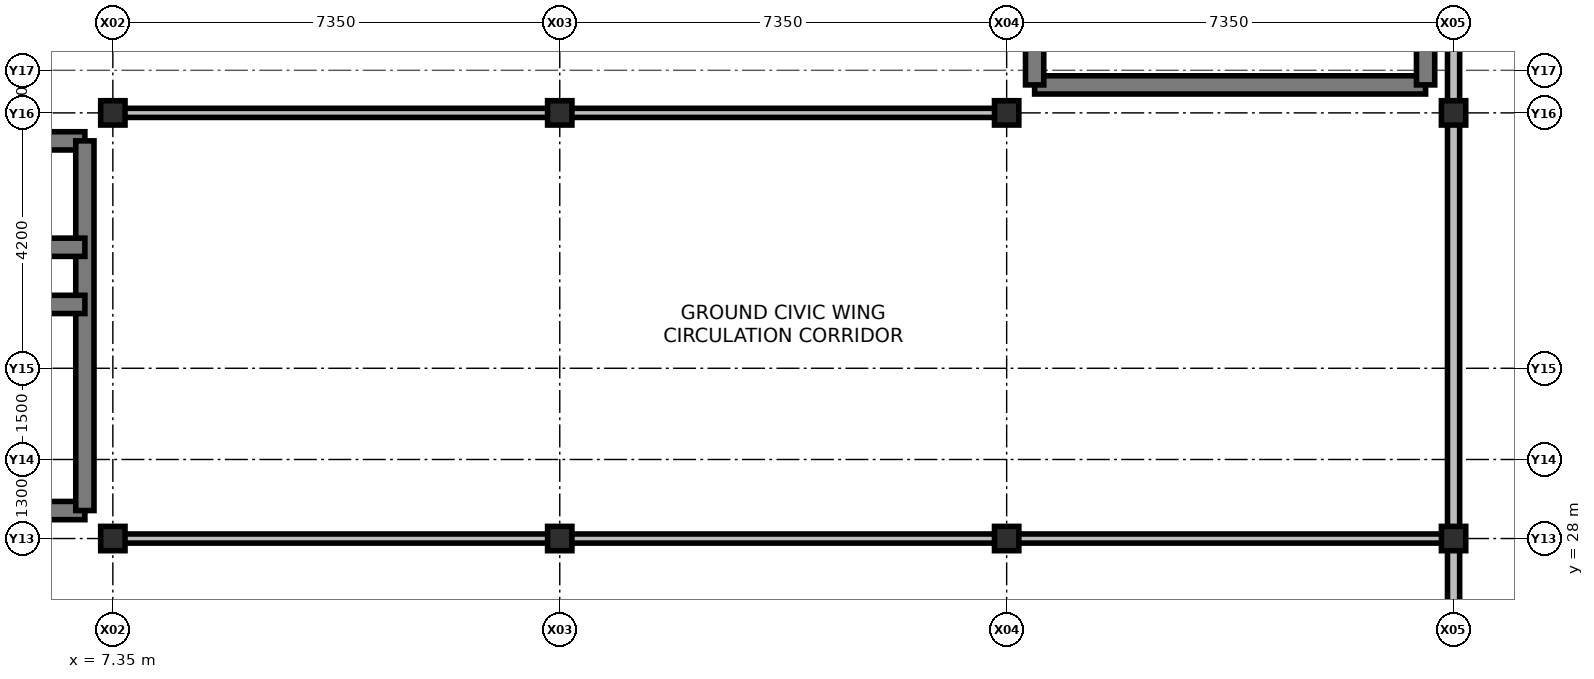
"""IFC4 building model, lengths in metres.
Left out: names, types, materials, properties, quantities, classifications, styles, units other than length and angle.
Written with IfcOpenShell. Run it as: python <this file> out.ifc"""

import sys

from ifc_helpers import new_model, si_unit, direction, frame, frame_2d, origin, origin_2d, place, context, subcontext, project, spatial, rectangle, i_section, extrude, element, fill, save


model = new_model("IFC4")
c1 = context("Model", 3, precision=1e-05, world=origin(), true_north=direction((0.0, 1.0)))
c2 = subcontext(c1, "Body", "Model", "MODEL_VIEW")
j1 = project(units=[si_unit("LENGTHUNIT", "METRE"), si_unit("PLANEANGLEUNIT", "RADIAN")], contexts=[c1])
p1 = place(None, origin())
s1 = spatial("IfcSite", under=j1, at=p1, CompositionType="ELEMENT")
p2 = place(p1, origin())
s2 = spatial("IfcBuilding", under=s1, at=p2, CompositionType="ELEMENT")
p3 = place(p2, origin())
s3 = spatial("IfcBuildingStorey", under=s2, at=p3, CompositionType="ELEMENT", Elevation=0.0)
for number, where, z_axis, x_axis in (
    (1, (7.35, 28.0, -0.35), (0.0, 0.0, 1.0), (1.0, 0.0, 0.0)),
    (2, (7.35, 35.0, -0.35), (0.0, 0.0, 1.0), (1.0, 0.0, 0.0)),
    (3, (14.7, 28.0, -0.35), (0.0, 0.0, 1.0), (1.0, 0.0, 0.0)),
    (4, (14.7, 35.0, -0.35), (0.0, 0.0, 1.0), (1.0, 0.0, 0.0)),
    (5, (22.05, 28.0, -0.35), (0.0, 0.0, 1.0), (1.0, 0.0, 0.0)),
    (6, (22.05, 35.0, -0.35), (0.0, 0.0, 1.0), (1.0, 0.0, 0.0)),
    (7, (29.4, 28.0, -0.35), (0.0, 0.0, 1.0), (1.0, 0.0, 0.0)),
    (8, (29.4, 35.0, -0.35), (0.0, 0.0, 1.0), (1.0, 0.0, 0.0)),
):
    element("IfcColumn", number, at=place(p3, frame(where, z_axis=z_axis, x_axis=x_axis)), inside=s3, PredefinedType="COLUMN", context=c2, shape_type="SweptSolid", body=[
        extrude(i_section(OverallWidth=0.4, OverallDepth=0.4, WebThickness=0.013, FlangeThickness=0.021, at=origin_2d()), origin(), (0.0, 0.0, 1.0), 6.35),
    ])
p4 = place(p3, frame((0.46, 28.46, -0.35), z_axis=(0.0, 0.0, 1.0), x_axis=(1.0, 0.0, 0.0)))
e9 = element("IfcWall", 9, at=p4, inside=s3, PredefinedType="SHEAR", context=c2, shape_type="SweptSolid", body=[
    extrude(rectangle(XDim=6.43, YDim=0.3, at=frame_2d((3.215, 0.0))), origin(), (0.0, 0.0, 1.0), 6.07),
])
p5 = place(p3, frame((0.46, 34.54, -0.35), z_axis=(0.0, 0.0, 1.0), x_axis=(1.0, 0.0, 0.0)))
e10 = element("IfcWall", 10, at=p5, inside=s3, PredefinedType="SHEAR", context=c2, shape_type="SweptSolid", body=[
    extrude(rectangle(XDim=6.43, YDim=0.3, at=frame_2d((3.215, 0.0))), origin(), (0.0, 0.0, 1.0), 6.07),
])
p6 = place(p5, frame((0.55, 0.0, 0.35)))
e11 = element("IfcOpeningElement", 11, at=p6, cuts=e10, PredefinedType="OPENING", context=c2, shape_type="SweptSolid", body=[
    extrude(rectangle(XDim=1.5, YDim=2.2, at=frame_2d((0.75, 1.1))), frame((0.0, 0.16, 0.0), z_axis=(0.0, -1.0, 0.0), x_axis=(1.0, 0.0, 0.0)), (0.0, 0.0, 1.0), 0.32),
])
p7 = place(p3, frame((6.89, 28.46, -0.35), z_axis=(0.0, 0.0, 1.0), x_axis=(0.0, 1.0, 0.0)))
e12 = element("IfcWall", 12, at=p7, inside=s3, PredefinedType="SHEAR", context=c2, shape_type="SweptSolid", body=[
    extrude(rectangle(XDim=6.08, YDim=0.3, at=frame_2d((3.04, 0.0))), origin(), (0.0, 0.0, 1.0), 6.07),
])
p8 = place(p3, frame((0.46, 31.85, -0.35), z_axis=(0.0, 0.0, 1.0), x_axis=(1.0, 0.0, 0.0)))
e13 = element("IfcWall", 13, at=p8, inside=s3, PredefinedType="SHEAR", context=c2, shape_type="SweptSolid", body=[
    extrude(rectangle(XDim=6.43, YDim=0.3, at=frame_2d((3.215, 0.0))), origin(), (0.0, 0.0, 1.0), 6.07),
])
p9 = place(p8, frame((0.185, 0.0, 0.35)))
e14 = element("IfcOpeningElement", 14, at=p9, cuts=e13, PredefinedType="OPENING", context=c2, shape_type="SweptSolid", body=[
    extrude(rectangle(XDim=1.05, YDim=2.15, at=frame_2d((0.525, 1.075))), frame((0.0, 0.16, 0.0), z_axis=(0.0, -1.0, 0.0), x_axis=(1.0, 0.0, 0.0)), (0.0, 0.0, 1.0), 0.32),
])
p10 = place(p3, frame((3.34, 32.79, -0.35), z_axis=(0.0, 0.0, 1.0), x_axis=(1.0, 0.0, 0.0)))
e15 = element("IfcWall", 15, at=p10, inside=s3, PredefinedType="SHEAR", context=c2, shape_type="SweptSolid", body=[
    extrude(rectangle(XDim=3.55, YDim=0.3, at=frame_2d((1.775, 0.0))), origin(), (0.0, 0.0, 1.0), 6.07),
])
p11 = place(p10, frame((0.25, 0.0, 0.35)))
e16 = element("IfcOpeningElement", 16, at=p11, cuts=e15, PredefinedType="OPENING", context=c2, shape_type="SweptSolid", body=[
    extrude(rectangle(XDim=1.1, YDim=2.15, at=frame_2d((0.55, 1.075))), frame((0.0, 0.16, 0.0), z_axis=(0.0, -1.0, 0.0), x_axis=(1.0, 0.0, 0.0)), (0.0, 0.0, 1.0), 0.32),
])
p12 = place(p10, frame((1.75, 0.0, 0.35)))
e17 = element("IfcOpeningElement", 17, at=p12, cuts=e15, PredefinedType="OPENING", context=c2, shape_type="SweptSolid", body=[
    extrude(rectangle(XDim=1.2, YDim=2.2, at=frame_2d((0.6, 1.1))), frame((0.0, 0.16, 0.0), z_axis=(0.0, -1.0, 0.0), x_axis=(1.0, 0.0, 0.0)), (0.0, 0.0, 1.0), 0.32),
])
p13 = place(p3, frame((22.51, 35.46, -0.35), z_axis=(0.0, 0.0, 1.0), x_axis=(1.0, 0.0, 0.0)))
e18 = element("IfcWall", 18, at=p13, inside=s3, PredefinedType="SHEAR", context=c2, shape_type="SweptSolid", body=[
    extrude(rectangle(XDim=6.43, YDim=0.3, at=frame_2d((3.215, 0.0))), origin(), (0.0, 0.0, 1.0), 6.07),
])
for number, where, z_axis, x_axis in (
    (19, (22.51, 35.46, -0.35), (0.0, 0.0, 1.0), (0.0, 1.0, 0.0)),
    (20, (28.94, 35.46, -0.35), (0.0, 0.0, 1.0), (0.0, 1.0, 0.0)),
):
    element("IfcWall", number, at=place(p3, frame(where, z_axis=z_axis, x_axis=x_axis)), inside=s3, PredefinedType="SHEAR", context=c2, shape_type="SweptSolid", body=[
        extrude(rectangle(XDim=6.08, YDim=0.3, at=frame_2d((3.04, 0.0))), origin(), (0.0, 0.0, 1.0), 6.07),
    ])
p14 = place(p3, frame((29.4, 14.0, 0.0), z_axis=(0.0, 0.0, 1.0), x_axis=(0.0, 1.0, 0.0)))
e21 = element("IfcWall", 21, at=p14, inside=s3, PredefinedType="PARTITIONING", context=c2, shape_type="SweptSolid", body=[
    extrude(rectangle(XDim=49.0, YDim=0.2, at=frame_2d((24.5, 0.0))), origin(), (0.0, 0.0, 1.0), 4.35),
])
p15 = place(p14, frame((8.0, 0.0, 0.0)))
e22 = element("IfcOpeningElement", 22, at=p15, cuts=e21, PredefinedType="OPENING", context=c2, shape_type="SweptSolid", body=[
    extrude(rectangle(XDim=1.35, YDim=2.2, at=frame_2d((0.675, 1.1))), frame((0.0, 0.11, 0.0), z_axis=(0.0, -1.0, 0.0), x_axis=(1.0, 0.0, 0.0)), (0.0, 0.0, 1.0), 0.22),
])
p16 = place(p14, frame((17.2, 0.0, 0.0)))
e23 = element("IfcOpeningElement", 23, at=p16, cuts=e21, PredefinedType="OPENING", context=c2, shape_type="SweptSolid", body=[
    extrude(rectangle(XDim=1.4, YDim=2.2, at=frame_2d((0.7, 1.1))), frame((0.0, 0.11, 0.0), z_axis=(0.0, -1.0, 0.0), x_axis=(1.0, 0.0, 0.0)), (0.0, 0.0, 1.0), 0.22),
])
p17 = place(p14, frame((31.0, 0.0, 0.0)))
e24 = element("IfcOpeningElement", 24, at=p17, cuts=e21, PredefinedType="OPENING", context=c2, shape_type="SweptSolid", body=[
    extrude(rectangle(XDim=1.4, YDim=2.2, at=frame_2d((0.7, 1.1))), frame((0.0, 0.11, 0.0), z_axis=(0.0, -1.0, 0.0), x_axis=(1.0, 0.0, 0.0)), (0.0, 0.0, 1.0), 0.22),
])
p18 = place(p3, frame((7.35, 28.0, 0.0), z_axis=(0.0, 0.0, 1.0), x_axis=(1.0, 0.0, 0.0)))
e25 = element("IfcWall", 25, at=p18, inside=s3, PredefinedType="PARTITIONING", context=c2, shape_type="SweptSolid", body=[
    extrude(rectangle(XDim=22.05, YDim=0.15, at=frame_2d((11.025, 0.0))), origin(), (0.0, 0.0, 1.0), 4.35),
])
p19 = place(p18, frame((10.2, 0.0, 0.0)))
e26 = element("IfcOpeningElement", 26, at=p19, cuts=e25, PredefinedType="OPENING", context=c2, shape_type="SweptSolid", body=[
    extrude(rectangle(XDim=1.7, YDim=2.25, at=frame_2d((0.85, 1.125))), frame((0.0, 0.085, 0.0), z_axis=(0.0, -1.0, 0.0), x_axis=(1.0, 0.0, 0.0)), (0.0, 0.0, 1.0), 0.17),
])
p20 = place(p3, frame((7.35, 35.0, 0.0), z_axis=(0.0, 0.0, 1.0), x_axis=(1.0, 0.0, 0.0)))
e27 = element("IfcWall", 27, at=p20, inside=s3, PredefinedType="PARTITIONING", context=c2, shape_type="SweptSolid", body=[
    extrude(rectangle(XDim=14.7, YDim=0.15, at=frame_2d((7.35, 0.0))), origin(), (0.0, 0.0, 1.0), 4.35),
])
p21 = place(p20, frame((4.2, 0.0, 0.0)))
e28 = element("IfcOpeningElement", 28, at=p21, cuts=e27, PredefinedType="OPENING", context=c2, shape_type="SweptSolid", body=[
    extrude(rectangle(XDim=1.1, YDim=2.1, at=frame_2d((0.55, 1.05))), frame((0.0, 0.085, 0.0), z_axis=(0.0, -1.0, 0.0), x_axis=(1.0, 0.0, 0.0)), (0.0, 0.0, 1.0), 0.17),
])
p22 = place(p16, origin())
e29 = element("IfcDoor", 29, at=p22, inside=s3, OperationType="DOUBLE_DOOR_SINGLE_SWING", PredefinedType="DOOR", context=c2, shape_type="SweptSolid", body=[
    extrude(rectangle(XDim=1.4, YDim=2.2, at=frame_2d((0.7, 1.1))), frame((0.0, 0.025, 0.0), z_axis=(0.0, -1.0, 0.0), x_axis=(1.0, 0.0, 0.0)), (0.0, 0.0, 1.0), 0.05),
])
fill(e23, e29)
p23 = place(p19, origin())
e30 = element("IfcDoor", 30, at=p23, inside=s3, OperationType="DOUBLE_DOOR_SINGLE_SWING", PredefinedType="DOOR", context=c2, shape_type="SweptSolid", body=[
    extrude(rectangle(XDim=1.7, YDim=2.25, at=frame_2d((0.85, 1.125))), frame((0.0, 0.025, 0.0), z_axis=(0.0, -1.0, 0.0), x_axis=(1.0, 0.0, 0.0)), (0.0, 0.0, 1.0), 0.05),
])
fill(e26, e30)
p24 = place(p21, origin())
e31 = element("IfcDoor", 31, at=p24, inside=s3, OperationType="SINGLE_SWING_RIGHT", PredefinedType="DOOR", context=c2, shape_type="SweptSolid", body=[
    extrude(rectangle(XDim=1.1, YDim=2.1, at=frame_2d((0.55, 1.05))), frame((0.0, 0.025, 0.0), z_axis=(0.0, -1.0, 0.0), x_axis=(1.0, 0.0, 0.0)), (0.0, 0.0, 1.0), 0.05),
])
fill(e28, e31)
save(model, sys.argv[1])
